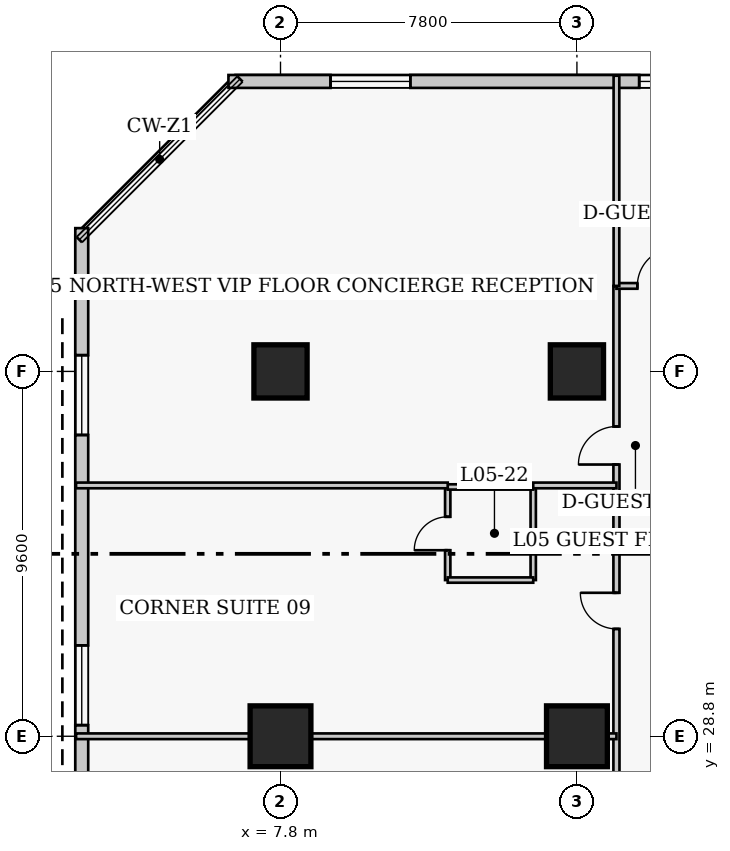
"""IFC4 building model, lengths in metres.
Left out: names, types, materials, properties, quantities, classifications, styles, units other than length and angle.
Written with IfcOpenShell. Run it as: python <this file> out.ifc"""

import sys

from ifc_helpers import new_model, si_unit, direction, frame, frame_2d, origin, origin_2d, place, context, subcontext, project, spatial, rectangle, extrude, element, fill, save


model = new_model("IFC4")
c1 = context("Model", 3, precision=1e-05, world=origin(), true_north=direction((0.0, 1.0)))
c2 = subcontext(c1, "Body", "Model", "MODEL_VIEW")
j1 = project(units=[si_unit("LENGTHUNIT", "METRE"), si_unit("PLANEANGLEUNIT", "RADIAN")], contexts=[c1])
p1 = place(None, origin())
s1 = spatial("IfcSite", under=j1, at=p1, CompositionType="ELEMENT")
p2 = place(p1, origin())
s2 = spatial("IfcBuilding", under=s1, at=p2, CompositionType="ELEMENT")
p3 = place(p2, frame((0.0, 0.0, 26.0)))
s3 = spatial("IfcBuildingStorey", under=s2, at=p3, CompositionType="ELEMENT", Elevation=26.0)
p4 = place(p3, frame((7.8, 28.8, 0.0), z_axis=(0.0, 0.0, 1.0), x_axis=(1.0, 0.0, 0.0)))
e1 = element("IfcColumn", 1, at=p4, inside=s3, PredefinedType="COLUMN", context=c2, shape_type="SweptSolid", body=[
    extrude(rectangle(XDim=1.6, YDim=1.6, at=origin_2d()), origin(), (0.0, 0.0, 1.0), 3.8),
])
p5 = place(p3, frame((7.8, 38.4, 0.0), z_axis=(0.0, 0.0, 1.0), x_axis=(1.0, 0.0, 0.0)))
e2 = element("IfcColumn", 2, at=p5, inside=s3, PredefinedType="COLUMN", context=c2, shape_type="SweptSolid", body=[
    extrude(rectangle(XDim=1.4, YDim=1.4, at=origin_2d()), origin(), (0.0, 0.0, 1.0), 3.8),
])
p6 = place(p3, frame((15.6, 28.8, 0.0), z_axis=(0.0, 0.0, 1.0), x_axis=(1.0, 0.0, 0.0)))
e3 = element("IfcColumn", 3, at=p6, inside=s3, PredefinedType="COLUMN", context=c2, shape_type="SweptSolid", body=[
    extrude(rectangle(XDim=1.6, YDim=1.6, at=origin_2d()), origin(), (0.0, 0.0, 1.0), 3.8),
])
p7 = place(p3, frame((15.6, 38.4, 0.0), z_axis=(0.0, 0.0, 1.0), x_axis=(1.0, 0.0, 0.0)))
e4 = element("IfcColumn", 4, at=p7, inside=s3, PredefinedType="COLUMN", context=c2, shape_type="SweptSolid", body=[
    extrude(rectangle(XDim=1.4, YDim=1.4, at=origin_2d()), origin(), (0.0, 0.0, 1.0), 3.8),
])
p8 = place(p3, frame((36.32, 46.03, 0.0), z_axis=(0.0, 0.0, 1.0), x_axis=(-1.0, 0.0, 0.0)))
e5 = element("IfcWall", 5, at=p8, inside=s3, PredefinedType="SOLIDWALL", context=c2, shape_type="SweptSolid", body=[
    extrude(rectangle(XDim=29.89, YDim=0.34, at=frame_2d((14.945, 0.0))), origin(), (0.0, 0.0, 1.0), 3.54),
])
p9 = place(p8, frame((2.686, 0.0, 0.85)))
e6 = element("IfcOpeningElement", 6, at=p9, cuts=e5, PredefinedType="OPENING", context=c2, shape_type="SweptSolid", body=[
    extrude(rectangle(XDim=2.1, YDim=1.85, at=frame_2d((1.05, 0.925))), frame((0.0, 0.18, 0.0), z_axis=(0.0, -1.0, 0.0), x_axis=(1.0, 0.0, 0.0)), (0.0, 0.0, 1.0), 0.36),
])
p10 = place(p8, frame((10.159, 0.0, 0.85)))
e7 = element("IfcOpeningElement", 7, at=p10, cuts=e5, PredefinedType="OPENING", context=c2, shape_type="SweptSolid", body=[
    extrude(rectangle(XDim=2.1, YDim=1.85, at=frame_2d((1.05, 0.925))), frame((0.0, 0.18, 0.0), z_axis=(0.0, -1.0, 0.0), x_axis=(1.0, 0.0, 0.0)), (0.0, 0.0, 1.0), 0.36),
])
p11 = place(p8, frame((16.981, 0.0, 0.85)))
e8 = element("IfcOpeningElement", 8, at=p11, cuts=e5, PredefinedType="OPENING", context=c2, shape_type="SweptSolid", body=[
    extrude(rectangle(XDim=2.1, YDim=1.85, at=frame_2d((1.05, 0.925))), frame((0.0, 0.18, 0.0), z_axis=(0.0, -1.0, 0.0), x_axis=(1.0, 0.0, 0.0)), (0.0, 0.0, 1.0), 0.36),
])
p12 = place(p8, frame((25.104, 0.0, 0.85)))
e9 = element("IfcOpeningElement", 9, at=p12, cuts=e5, PredefinedType="OPENING", context=c2, shape_type="SweptSolid", body=[
    extrude(rectangle(XDim=2.1, YDim=1.85, at=frame_2d((1.05, 0.925))), frame((0.0, 0.18, 0.0), z_axis=(0.0, -1.0, 0.0), x_axis=(1.0, 0.0, 0.0)), (0.0, 0.0, 1.0), 0.36),
])
p13 = place(p3, frame((2.57, 42.17, 0.0), z_axis=(0.0, 0.0, 1.0), x_axis=(0.0, -1.0, 0.0)))
e10 = element("IfcWall", 10, at=p13, inside=s3, PredefinedType="SOLIDWALL", context=c2, shape_type="SweptSolid", body=[
    extrude(rectangle(XDim=35.14, YDim=0.34, at=frame_2d((17.57, 0.0))), origin(), (0.0, 0.0, 1.0), 3.54),
])
p14 = place(p13, frame((3.343, 0.0, 0.85)))
e11 = element("IfcOpeningElement", 11, at=p14, cuts=e10, PredefinedType="OPENING", context=c2, shape_type="SweptSolid", body=[
    extrude(rectangle(XDim=2.1, YDim=1.85, at=frame_2d((1.05, 0.925))), frame((0.0, 0.18, 0.0), z_axis=(0.0, -1.0, 0.0), x_axis=(1.0, 0.0, 0.0)), (0.0, 0.0, 1.0), 0.36),
])
p15 = place(p13, frame((10.978, 0.0, 0.85)))
e12 = element("IfcOpeningElement", 12, at=p15, cuts=e10, PredefinedType="OPENING", context=c2, shape_type="SweptSolid", body=[
    extrude(rectangle(XDim=2.1, YDim=1.85, at=frame_2d((1.05, 0.925))), frame((0.0, 0.18, 0.0), z_axis=(0.0, -1.0, 0.0), x_axis=(1.0, 0.0, 0.0)), (0.0, 0.0, 1.0), 0.36),
])
p16 = place(p13, frame((19.762, 0.0, 0.85)))
e13 = element("IfcOpeningElement", 13, at=p16, cuts=e10, PredefinedType="OPENING", context=c2, shape_type="SweptSolid", body=[
    extrude(rectangle(XDim=2.1, YDim=1.85, at=frame_2d((1.05, 0.925))), frame((0.0, 0.18, 0.0), z_axis=(0.0, -1.0, 0.0), x_axis=(1.0, 0.0, 0.0)), (0.0, 0.0, 1.0), 0.36),
])
p17 = place(p13, frame((28.548, 0.0, 0.85)))
e14 = element("IfcOpeningElement", 14, at=p17, cuts=e10, PredefinedType="OPENING", context=c2, shape_type="SweptSolid", body=[
    extrude(rectangle(XDim=2.1, YDim=1.85, at=frame_2d((1.05, 0.925))), frame((0.0, 0.18, 0.0), z_axis=(0.0, -1.0, 0.0), x_axis=(1.0, 0.0, 0.0)), (0.0, 0.0, 1.0), 0.36),
])
p18 = place(p3, frame((16.64, 5.05, 0.0), z_axis=(0.0, 0.0, 1.0), x_axis=(0.0, 1.0, 0.0)))
e15 = element("IfcWall", 15, at=p18, inside=s3, PredefinedType="PARTITIONING", context=c2, shape_type="SweptSolid", body=[
    extrude(rectangle(XDim=35.6, YDim=0.16, at=frame_2d((17.8, 0.0))), origin(), (0.0, 0.0, 1.0), 3.54),
])
p19 = place(p18, frame((2.6, 0.0, 0.0)))
e16 = element("IfcOpeningElement", 16, at=p19, cuts=e15, PredefinedType="OPENING", context=c2, shape_type="SweptSolid", body=[
    extrude(rectangle(XDim=0.95, YDim=2.1, at=frame_2d((0.475, 1.05))), frame((0.0, 0.09, 0.0), z_axis=(0.0, -1.0, 0.0), x_axis=(1.0, 0.0, 0.0)), (0.0, 0.0, 1.0), 0.18),
])
p20 = place(p18, frame((10.075, 0.0, 0.0)))
e17 = element("IfcOpeningElement", 17, at=p20, cuts=e15, PredefinedType="OPENING", context=c2, shape_type="SweptSolid", body=[
    extrude(rectangle(XDim=0.95, YDim=2.1, at=frame_2d((0.475, 1.05))), frame((0.0, 0.09, 0.0), z_axis=(0.0, -1.0, 0.0), x_axis=(1.0, 0.0, 0.0)), (0.0, 0.0, 1.0), 0.18),
])
p21 = place(p18, frame((18.875, 0.0, 0.0)))
e18 = element("IfcOpeningElement", 18, at=p21, cuts=e15, PredefinedType="OPENING", context=c2, shape_type="SweptSolid", body=[
    extrude(rectangle(XDim=0.95, YDim=2.1, at=frame_2d((0.475, 1.05))), frame((0.0, 0.09, 0.0), z_axis=(0.0, -1.0, 0.0), x_axis=(1.0, 0.0, 0.0)), (0.0, 0.0, 1.0), 0.18),
])
p22 = place(p18, frame((26.575, 0.0, 0.0)))
e19 = element("IfcOpeningElement", 19, at=p22, cuts=e15, PredefinedType="OPENING", context=c2, shape_type="SweptSolid", body=[
    extrude(rectangle(XDim=0.95, YDim=2.1, at=frame_2d((0.475, 1.05))), frame((0.0, 0.09, 0.0), z_axis=(0.0, -1.0, 0.0), x_axis=(1.0, 0.0, 0.0)), (0.0, 0.0, 1.0), 0.18),
])
p23 = place(p18, frame((30.9, 0.0, 0.0)))
e20 = element("IfcOpeningElement", 20, at=p23, cuts=e15, PredefinedType="OPENING", context=c2, shape_type="SweptSolid", body=[
    extrude(rectangle(XDim=1.0, YDim=2.15, at=frame_2d((0.5, 1.075))), frame((0.0, 0.09, 0.0), z_axis=(0.0, -1.0, 0.0), x_axis=(1.0, 0.0, 0.0)), (0.0, 0.0, 1.0), 0.18),
])
p24 = place(p3, frame((16.64, 40.65, 0.0), z_axis=(0.0, 0.0, 1.0), x_axis=(1.0, 0.0, 0.0)))
e21 = element("IfcWall", 21, at=p24, inside=s3, PredefinedType="PARTITIONING", context=c2, shape_type="SweptSolid", body=[
    extrude(rectangle(XDim=5.46, YDim=0.15, at=frame_2d((2.73, 0.0))), origin(), (0.0, 0.0, 1.0), 3.54),
])
p25 = place(p24, frame((0.55, 0.0, 0.0)))
e22 = element("IfcOpeningElement", 22, at=p25, cuts=e21, PredefinedType="OPENING", context=c2, shape_type="SweptSolid", body=[
    extrude(rectangle(XDim=1.0, YDim=2.15, at=frame_2d((0.5, 1.075))), frame((0.0, 0.085, 0.0), z_axis=(0.0, -1.0, 0.0), x_axis=(1.0, 0.0, 0.0)), (0.0, 0.0, 1.0), 0.17),
])
p26 = place(p3, frame((16.64, 40.65, 0.0), z_axis=(0.0, 0.0, 1.0), x_axis=(0.0, 1.0, 0.0)))
e23 = element("IfcWall", 23, at=p26, inside=s3, PredefinedType="PARTITIONING", context=c2, shape_type="SweptSolid", body=[
    extrude(rectangle(XDim=5.53, YDim=0.15, at=frame_2d((2.765, 0.0))), origin(), (0.0, 0.0, 1.0), 3.54),
])
p27 = place(p3, frame((2.42, 28.8, 0.0), z_axis=(0.0, 0.0, 1.0), x_axis=(1.0, 0.0, 0.0)))
e24 = element("IfcWall", 24, at=p27, inside=s3, PredefinedType="PARTITIONING", context=c2, shape_type="SweptSolid", body=[
    extrude(rectangle(XDim=14.22, YDim=0.15, at=frame_2d((7.11, 0.0))), origin(), (0.0, 0.0, 1.0), 2.593),
])
p28 = place(p3, frame((12.2, 32.91, 0.0), z_axis=(0.0, 0.0, 1.0), x_axis=(0.0, 1.0, 0.0)))
e25 = element("IfcWall", 25, at=p28, inside=s3, PredefinedType="PLUMBINGWALL", context=c2, shape_type="SweptSolid", body=[
    extrude(rectangle(XDim=2.45, YDim=0.14, at=frame_2d((1.225, 0.0))), origin(), (0.0, 0.0, 1.0), 3.54),
])
p29 = place(p28, frame((0.785, 0.0, 0.0)))
e26 = element("IfcOpeningElement", 26, at=p29, cuts=e25, PredefinedType="OPENING", context=c2, shape_type="SweptSolid", body=[
    extrude(rectangle(XDim=0.88, YDim=2.05, at=frame_2d((0.44, 1.025))), frame((0.0, 0.08, 0.0), z_axis=(0.0, -1.0, 0.0), x_axis=(1.0, 0.0, 0.0)), (0.0, 0.0, 1.0), 0.16),
])
p30 = place(p3, frame((14.45, 32.91, 0.0), z_axis=(0.0, 0.0, 1.0), x_axis=(0.0, 1.0, 0.0)))
e27 = element("IfcWall", 27, at=p30, inside=s3, PredefinedType="PLUMBINGWALL", context=c2, shape_type="SweptSolid", body=[
    extrude(rectangle(XDim=2.45, YDim=0.14, at=frame_2d((1.225, 0.0))), origin(), (0.0, 0.0, 1.0), 3.54),
])
for number, where, z_axis, x_axis in (
    (28, (12.2, 32.91, 0.0), (0.0, 0.0, 1.0), (1.0, 0.0, 0.0)),
    (29, (12.2, 35.36, 0.0), (0.0, 0.0, 1.0), (1.0, 0.0, 0.0)),
):
    element("IfcWall", number, at=place(p3, frame(where, z_axis=z_axis, x_axis=x_axis)), inside=s3, PredefinedType="PLUMBINGWALL", context=c2, shape_type="SweptSolid", body=[
        extrude(rectangle(XDim=2.25, YDim=0.14, at=frame_2d((1.125, 0.0))), origin(), (0.0, 0.0, 1.0), 3.54),
    ])
p31 = place(p3, frame((2.42, 35.4, 0.0), z_axis=(0.0, 0.0, 1.0), x_axis=(1.0, 0.0, 0.0)))
e30 = element("IfcWall", 30, at=p31, inside=s3, PredefinedType="PARTITIONING", context=c2, shape_type="SweptSolid", body=[
    extrude(rectangle(XDim=9.78, YDim=0.15, at=frame_2d((4.89, 0.0))), origin(), (0.0, 0.0, 1.0), 3.54),
])
p32 = place(p3, frame((14.45, 35.4, 0.0), z_axis=(0.0, 0.0, 1.0), x_axis=(1.0, 0.0, 0.0)))
e31 = element("IfcWall", 31, at=p32, inside=s3, PredefinedType="PARTITIONING", context=c2, shape_type="SweptSolid", body=[
    extrude(rectangle(XDim=2.19, YDim=0.15, at=frame_2d((1.095, 0.0))), origin(), (0.0, 0.0, 1.0), 3.54),
])
p33 = place(p11, origin())
e32 = element("IfcWindow", 32, at=p33, inside=s3, PartitioningType="SINGLE_PANEL", PredefinedType="WINDOW", context=c2, shape_type="SweptSolid", body=[
    extrude(rectangle(XDim=2.1, YDim=1.85, at=frame_2d((1.05, 0.925))), frame((0.0, 0.03, 0.0), z_axis=(0.0, -1.0, 0.0), x_axis=(1.0, 0.0, 0.0)), (0.0, 0.0, 1.0), 0.06),
])
fill(e8, e32)
p34 = place(p12, origin())
e33 = element("IfcWindow", 33, at=p34, inside=s3, PartitioningType="SINGLE_PANEL", PredefinedType="WINDOW", context=c2, shape_type="SweptSolid", body=[
    extrude(rectangle(XDim=2.1, YDim=1.85, at=frame_2d((1.05, 0.925))), frame((0.0, 0.03, 0.0), z_axis=(0.0, -1.0, 0.0), x_axis=(1.0, 0.0, 0.0)), (0.0, 0.0, 1.0), 0.06),
])
fill(e9, e33)
p35 = place(p14, origin())
e34 = element("IfcWindow", 34, at=p35, inside=s3, PartitioningType="SINGLE_PANEL", PredefinedType="WINDOW", context=c2, shape_type="SweptSolid", body=[
    extrude(rectangle(XDim=2.1, YDim=1.85, at=frame_2d((1.05, 0.925))), frame((0.0, 0.03, 0.0), z_axis=(0.0, -1.0, 0.0), x_axis=(1.0, 0.0, 0.0)), (0.0, 0.0, 1.0), 0.06),
])
fill(e11, e34)
p36 = place(p15, origin())
e35 = element("IfcWindow", 35, at=p36, inside=s3, PartitioningType="SINGLE_PANEL", PredefinedType="WINDOW", context=c2, shape_type="SweptSolid", body=[
    extrude(rectangle(XDim=2.1, YDim=1.85, at=frame_2d((1.05, 0.925))), frame((0.0, 0.03, 0.0), z_axis=(0.0, -1.0, 0.0), x_axis=(1.0, 0.0, 0.0)), (0.0, 0.0, 1.0), 0.06),
])
fill(e12, e35)
p37 = place(p25, origin())
e36 = element("IfcDoor", 36, at=p37, inside=s3, OperationType="SINGLE_SWING_RIGHT", PredefinedType="DOOR", context=c2, shape_type="SweptSolid", body=[
    extrude(rectangle(XDim=1.0, YDim=2.15, at=frame_2d((0.5, 1.075))), frame((0.0, 0.025, 0.0), z_axis=(0.0, -1.0, 0.0), x_axis=(1.0, 0.0, 0.0)), (0.0, 0.0, 1.0), 0.05),
])
fill(e22, e36)
p38 = place(p29, origin())
e37 = element("IfcDoor", 37, at=p38, inside=s3, OperationType="SINGLE_SWING_LEFT", PredefinedType="DOOR", context=c2, shape_type="SweptSolid", body=[
    extrude(rectangle(XDim=0.88, YDim=2.05, at=frame_2d((0.44, 1.025))), frame((0.0, 0.025, 0.0), z_axis=(0.0, -1.0, 0.0), x_axis=(1.0, 0.0, 0.0)), (0.0, 0.0, 1.0), 0.05),
])
fill(e26, e37)
p39 = place(p22, origin())
e38 = element("IfcDoor", 38, at=p39, inside=s3, OperationType="SINGLE_SWING_RIGHT", PredefinedType="DOOR", context=c2, shape_type="SweptSolid", body=[
    extrude(rectangle(XDim=0.95, YDim=2.1, at=frame_2d((0.475, 1.05))), frame((0.0, 0.025, 0.0), z_axis=(0.0, -1.0, 0.0), x_axis=(1.0, 0.0, 0.0)), (0.0, 0.0, 1.0), 0.05),
])
fill(e19, e38)
p40 = place(p23, origin())
e39 = element("IfcDoor", 39, at=p40, inside=s3, OperationType="SINGLE_SWING_LEFT", PredefinedType="DOOR", context=c2, shape_type="SweptSolid", body=[
    extrude(rectangle(XDim=1.0, YDim=2.15, at=frame_2d((0.5, 1.075))), frame((0.0, 0.025, 0.0), z_axis=(0.0, -1.0, 0.0), x_axis=(1.0, 0.0, 0.0)), (0.0, 0.0, 1.0), 0.05),
])
fill(e20, e39)
save(model, sys.argv[1])
